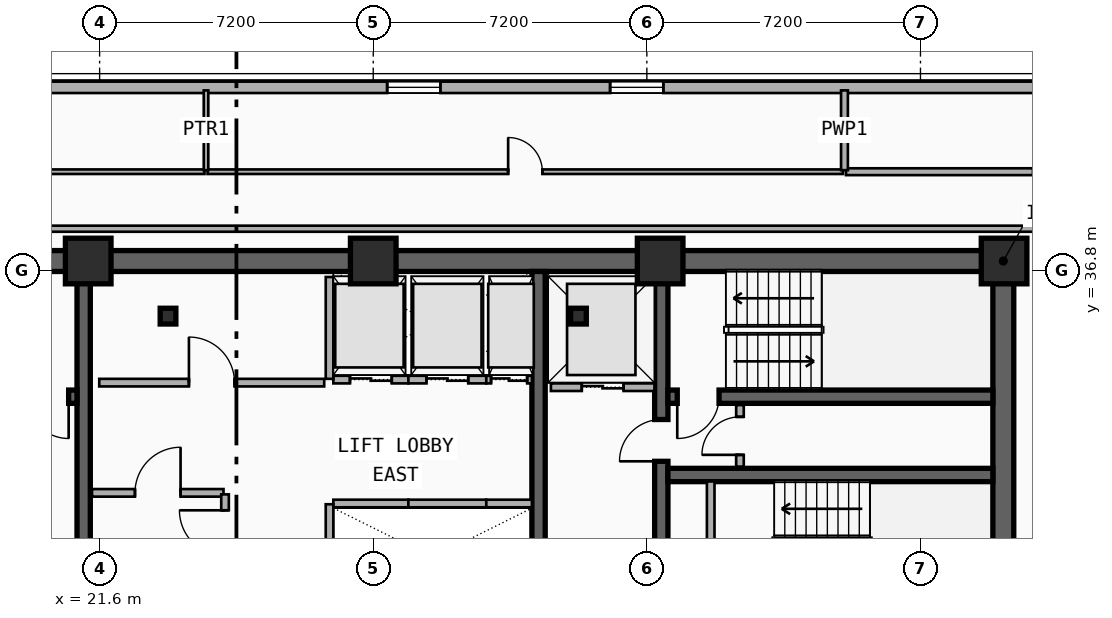
"""IFC4 building model, lengths in metres.
Left out: names, types, materials, properties, quantities, classifications, styles, units other than length and angle.
Written with IfcOpenShell. Run it as: python <this file> out.ifc"""

import sys

from ifc_helpers import new_model, si_unit, direction, frame, frame_2d, origin, origin_2d, place, context, subcontext, project, spatial, rectangle, i_section, extrude, element, fill, save


model = new_model("IFC4")
c1 = context("Model", 3, precision=1e-05, world=origin(), true_north=direction((0.0, 1.0)))
c2 = subcontext(c1, "Body", "Model", "MODEL_VIEW")
j1 = project(units=[si_unit("LENGTHUNIT", "METRE"), si_unit("PLANEANGLEUNIT", "RADIAN")], contexts=[c1])
p1 = place(None, origin())
s1 = spatial("IfcSite", under=j1, at=p1, CompositionType="ELEMENT")
p2 = place(p1, origin())
s2 = spatial("IfcBuilding", under=s1, at=p2, CompositionType="ELEMENT")
p3 = place(p2, frame((0.0, 0.0, 166.1)))
s3 = spatial("IfcBuildingStorey", under=s2, at=p3, CompositionType="ELEMENT", Elevation=166.1)
p4 = place(p3, frame((12.15, 37.05, 0.0), z_axis=(0.0, 0.0, 1.0), x_axis=(1.0, 0.0, 0.0)))
e1 = element("IfcWall", 1, at=p4, inside=s3, PredefinedType="SHEAR", context=c2, shape_type="SweptSolid", body=[
    extrude(rectangle(XDim=33.23, YDim=0.55, at=frame_2d((16.615, 0.0))), origin(), (0.0, 0.0, 1.0), 3.55),
])
p5 = place(p3, frame((45.38, 28.095, 0.0), z_axis=(0.0, 0.0, 1.0), x_axis=(0.0, 1.0, 0.0)))
e2 = element("IfcWall", 2, at=p5, inside=s3, PredefinedType="SHEAR", context=c2, shape_type="SweptSolid", body=[
    extrude(rectangle(XDim=8.68, YDim=0.55, at=frame_2d((4.34, 0.0))), origin(), (0.0, 0.0, 1.0), 3.55),
])
for number, where, z_axis, x_axis in (
    (3, (21.18, 28.095, 0.0), (0.0, 0.0, 1.0), (0.0, 1.0, 0.0)),
    (4, (33.15, 28.095, 0.0), (0.0, 0.0, 1.0), (0.0, 1.0, 0.0)),
):
    element("IfcWall", number, at=place(p3, frame(where, z_axis=z_axis, x_axis=x_axis)), inside=s3, PredefinedType="SHEAR", context=c2, shape_type="SweptSolid", body=[
        extrude(rectangle(XDim=8.68, YDim=0.35, at=frame_2d((4.34, 0.0))), origin(), (0.0, 0.0, 1.0), 3.55),
    ])
p6 = place(p3, frame((36.38, 28.095, 0.0), z_axis=(0.0, 0.0, 1.0), x_axis=(0.0, 1.0, 0.0)))
e5 = element("IfcWall", 5, at=p6, inside=s3, PredefinedType="SHEAR", context=c2, shape_type="SweptSolid", body=[
    extrude(rectangle(XDim=8.68, YDim=0.35, at=frame_2d((4.34, 0.0))), origin(), (0.0, 0.0, 1.0), 3.55),
])
p7 = place(p6, frame((3.685, 0.0, 0.0)))
e6 = element("IfcOpeningElement", 6, at=p7, cuts=e5, PredefinedType="OPENING", context=c2, shape_type="SweptSolid", body=[
    extrude(rectangle(XDim=1.1, YDim=2.15, at=frame_2d((0.55, 1.075))), frame((0.0, 0.185, 0.0), z_axis=(0.0, -1.0, 0.0), x_axis=(1.0, 0.0, 0.0)), (0.0, 0.0, 1.0), 0.37),
])
p8 = place(p3, frame((21.005, 33.48, 0.0), z_axis=(0.0, 0.0, 1.0), x_axis=(-1.0, 0.0, 0.0)))
e7 = element("IfcWall", 7, at=p8, inside=s3, PredefinedType="SHEAR", context=c2, shape_type="SweptSolid", body=[
    extrude(rectangle(XDim=8.58, YDim=0.35, at=frame_2d((4.29, 0.0))), origin(), (0.0, 0.0, 1.0), 3.55),
])
p9 = place(p8, frame((0.22, 0.0, 0.0)))
e8 = element("IfcOpeningElement", 8, at=p9, cuts=e7, PredefinedType="OPENING", context=c2, shape_type="SweptSolid", body=[
    extrude(rectangle(XDim=1.1, YDim=2.15, at=frame_2d((0.55, 1.075))), frame((0.0, 0.185, 0.0), z_axis=(0.0, -1.0, 0.0), x_axis=(1.0, 0.0, 0.0)), (0.0, 0.0, 1.0), 0.37),
])
p10 = place(p3, frame((45.105, 33.48, 0.0), z_axis=(0.0, 0.0, 1.0), x_axis=(-1.0, 0.0, 0.0)))
e9 = element("IfcWall", 9, at=p10, inside=s3, PredefinedType="SHEAR", context=c2, shape_type="SweptSolid", body=[
    extrude(rectangle(XDim=8.55, YDim=0.35, at=frame_2d((4.275, 0.0))), origin(), (0.0, 0.0, 1.0), 3.55),
])
p11 = place(p10, frame((7.205, 0.0, 0.0)))
e10 = element("IfcOpeningElement", 10, at=p11, cuts=e9, PredefinedType="OPENING", context=c2, shape_type="SweptSolid", body=[
    extrude(rectangle(XDim=1.1, YDim=2.15, at=frame_2d((0.55, 1.075))), frame((0.0, 0.185, 0.0), z_axis=(0.0, -1.0, 0.0), x_axis=(1.0, 0.0, 0.0)), (0.0, 0.0, 1.0), 0.37),
])
p12 = place(p3, frame((36.555, 31.42, 0.0), z_axis=(0.0, 0.0, 1.0), x_axis=(1.0, 0.0, 0.0)))
e11 = element("IfcWall", 11, at=p12, inside=s3, PredefinedType="SHEAR", context=c2, shape_type="SweptSolid", body=[
    extrude(rectangle(XDim=8.55, YDim=0.35, at=frame_2d((4.275, 0.0))), origin(), (0.0, 0.0, 1.0), 3.55),
])
for number, where, z_axis, x_axis in (
    (12, (34.2, 35.6, 0.0), (0.0, 0.0, 1.0), (1.0, 0.0, 0.0)),
    (13, (23.4, 35.6, 0.0), (0.0, 0.0, 1.0), (1.0, 0.0, 0.0)),
):
    element("IfcColumn", number, at=place(p3, frame(where, z_axis=z_axis, x_axis=x_axis)), inside=s3, PredefinedType="COLUMN", context=c2, shape_type="SweptSolid", body=[
        extrude(i_section(OverallWidth=0.413, OverallDepth=0.415, WebThickness=0.03, FlangeThickness=0.047, FilletRadius=0.015, at=origin_2d()), origin(), (0.0, 0.0, 1.0), 3.55),
    ])
for number, where, z_axis, x_axis in (
    (14, (21.3, 37.05, 0.0), (0.0, 0.0, 1.0), (1.0, 0.0, 0.0)),
    (15, (28.8, 37.05, 0.0), (0.0, 0.0, 1.0), (1.0, 0.0, 0.0)),
    (16, (36.35, 37.05, 0.0), (0.0, 0.0, 1.0), (1.0, 0.0, 0.0)),
    (17, (45.4, 37.05, 0.0), (0.0, 0.0, 1.0), (1.0, 0.0, 0.0)),
):
    element("IfcColumn", number, at=place(p3, frame(where, z_axis=z_axis, x_axis=x_axis)), inside=s3, PredefinedType="COLUMN", context=c2, shape_type="SweptSolid", body=[
        extrude(rectangle(XDim=1.2, YDim=1.2, at=origin_2d()), origin(), (0.0, 0.0, 1.0), 3.55),
    ])
p13 = place(p3, frame((9.6, 41.62, 0.0), z_axis=(0.0, 0.0, 1.0), x_axis=(1.0, 0.0, 0.0)))
e18 = element("IfcWall", 18, at=p13, inside=s3, PredefinedType="SOLIDWALL", context=c2, shape_type="SweptSolid", body=[
    extrude(rectangle(XDim=38.4, YDim=0.3, at=frame_2d((19.2, 0.0))), origin(), (0.0, 0.0, 1.0), 3.29),
])
p14 = place(p13, frame((4.113, 0.0, 0.75)))
e19 = element("IfcOpeningElement", 19, at=p14, cuts=e18, PredefinedType="OPENING", context=c2, shape_type="SweptSolid", body=[
    extrude(rectangle(XDim=1.4, YDim=2.1, at=frame_2d((0.7, 1.05))), frame((0.0, 0.16, 0.0), z_axis=(0.0, -1.0, 0.0), x_axis=(1.0, 0.0, 0.0)), (0.0, 0.0, 1.0), 0.32),
])
p15 = place(p13, frame((9.307, 0.0, 0.75)))
e20 = element("IfcOpeningElement", 20, at=p15, cuts=e18, PredefinedType="OPENING", context=c2, shape_type="SweptSolid", body=[
    extrude(rectangle(XDim=1.4, YDim=2.1, at=frame_2d((0.7, 1.05))), frame((0.0, 0.16, 0.0), z_axis=(0.0, -1.0, 0.0), x_axis=(1.0, 0.0, 0.0)), (0.0, 0.0, 1.0), 0.32),
])
p16 = place(p13, frame((19.567, 0.0, 0.75)))
e21 = element("IfcOpeningElement", 21, at=p16, cuts=e18, PredefinedType="OPENING", context=c2, shape_type="SweptSolid", body=[
    extrude(rectangle(XDim=1.4, YDim=2.1, at=frame_2d((0.7, 1.05))), frame((0.0, 0.16, 0.0), z_axis=(0.0, -1.0, 0.0), x_axis=(1.0, 0.0, 0.0)), (0.0, 0.0, 1.0), 0.32),
])
p17 = place(p13, frame((25.433, 0.0, 0.75)))
e22 = element("IfcOpeningElement", 22, at=p17, cuts=e18, PredefinedType="OPENING", context=c2, shape_type="SweptSolid", body=[
    extrude(rectangle(XDim=1.4, YDim=2.1, at=frame_2d((0.7, 1.05))), frame((0.0, 0.16, 0.0), z_axis=(0.0, -1.0, 0.0), x_axis=(1.0, 0.0, 0.0)), (0.0, 0.0, 1.0), 0.32),
])
p18 = place(p3, frame((33.475, 33.73, 0.0), z_axis=(0.0, 0.0, 1.0), x_axis=(1.0, 0.0, 0.0)))
e23 = element("IfcWall", 23, at=p18, inside=s3, PredefinedType="PARTITIONING", context=c2, shape_type="SweptSolid", body=[
    extrude(rectangle(XDim=2.725, YDim=0.2, at=frame_2d((1.362, 0.0))), origin(), (0.0, 0.0, 1.0), 2.36),
])
p19 = place(p18, frame((0.812, 0.0, 0.0)))
e24 = element("IfcOpeningElement", 24, at=p19, cuts=e23, PredefinedType="OPENING", context=c2, shape_type="SweptSolid", body=[
    extrude(rectangle(XDim=1.1, YDim=2.15, at=frame_2d((0.55, 1.075))), frame((0.0, 0.11, 0.0), z_axis=(0.0, -1.0, 0.0), x_axis=(1.0, 0.0, 0.0)), (0.0, 0.0, 1.0), 0.22),
])
p20 = place(p3, frame((27.75, 30.67, 0.0), z_axis=(0.0, 0.0, 1.0), x_axis=(1.0, 0.0, 0.0)))
e25 = element("IfcWall", 25, at=p20, inside=s3, PredefinedType="PARTITIONING", context=c2, shape_type="SweptSolid", body=[
    extrude(rectangle(XDim=1.975, YDim=0.2, at=frame_2d((0.988, 0.0))), origin(), (0.0, 0.0, 1.0), 2.36),
])
p21 = place(p3, frame((27.65, 28.07, 0.0), z_axis=(0.0, 0.0, 1.0), x_axis=(0.0, 1.0, 0.0)))
e26 = element("IfcWall", 26, at=p21, inside=s3, PredefinedType="PARTITIONING", context=c2, shape_type="SweptSolid", body=[
    extrude(rectangle(XDim=2.58, YDim=0.2, at=frame_2d((1.29, 0.0))), origin(), (0.0, 0.0, 1.0), 2.36),
])
p22 = place(p3, frame((29.725, 30.67, 0.0), z_axis=(0.0, 0.0, 1.0), x_axis=(1.0, 0.0, 0.0)))
e27 = element("IfcWall", 27, at=p22, inside=s3, PredefinedType="PARTITIONING", context=c2, shape_type="SweptSolid", body=[
    extrude(rectangle(XDim=2.05, YDim=0.2, at=frame_2d((1.025, 0.0))), origin(), (0.0, 0.0, 1.0), 2.67),
])
p23 = place(p3, frame((31.775, 30.67, 0.0), z_axis=(0.0, 0.0, 1.0), x_axis=(1.0, 0.0, 0.0)))
e28 = element("IfcWall", 28, at=p23, inside=s3, PredefinedType="PARTITIONING", context=c2, shape_type="SweptSolid", body=[
    extrude(rectangle(XDim=1.2, YDim=0.2, at=frame_2d((0.6, 0.0))), origin(), (0.0, 0.0, 1.0), 2.67),
])
p24 = place(p3, frame((27.75, 33.93, 0.0), z_axis=(0.0, 0.0, 1.0), x_axis=(1.0, 0.0, 0.0)))
e29 = element("IfcWall", 29, at=p24, inside=s3, PredefinedType="PARTITIONING", context=c2, shape_type="SweptSolid", body=[
    extrude(rectangle(XDim=1.975, YDim=0.2, at=frame_2d((0.988, 0.0))), origin(), (0.0, 0.0, 1.0), 2.36),
])
p25 = place(p24, frame((0.438, 0.0, 0.0)))
e30 = element("IfcOpeningElement", 30, at=p25, cuts=e29, PredefinedType="OPENING", context=c2, shape_type="SweptSolid", body=[
    extrude(rectangle(XDim=1.1, YDim=2.15, at=frame_2d((0.55, 1.075))), frame((0.0, 0.11, 0.0), z_axis=(0.0, -1.0, 0.0), x_axis=(1.0, 0.0, 0.0)), (0.0, 0.0, 1.0), 0.22),
])
p26 = place(p3, frame((27.65, 33.95, 0.0), z_axis=(0.0, 0.0, 1.0), x_axis=(0.0, 1.0, 0.0)))
e31 = element("IfcWall", 31, at=p26, inside=s3, PredefinedType="PARTITIONING", context=c2, shape_type="SweptSolid", body=[
    extrude(rectangle(XDim=2.68, YDim=0.2, at=frame_2d((1.34, 0.0))), origin(), (0.0, 0.0, 1.0), 2.36),
])
p27 = place(p3, frame((29.725, 33.93, 0.0), z_axis=(0.0, 0.0, 1.0), x_axis=(1.0, 0.0, 0.0)))
e32 = element("IfcWall", 32, at=p27, inside=s3, PredefinedType="PARTITIONING", context=c2, shape_type="SweptSolid", body=[
    extrude(rectangle(XDim=2.05, YDim=0.2, at=frame_2d((1.025, 0.0))), origin(), (0.0, 0.0, 1.0), 3.29),
])
p28 = place(p27, frame((0.475, 0.0, 0.0)))
e33 = element("IfcOpeningElement", 33, at=p28, cuts=e32, PredefinedType="OPENING", context=c2, shape_type="SweptSolid", body=[
    extrude(rectangle(XDim=1.1, YDim=2.15, at=frame_2d((0.55, 1.075))), frame((0.0, 0.11, 0.0), z_axis=(0.0, -1.0, 0.0), x_axis=(1.0, 0.0, 0.0)), (0.0, 0.0, 1.0), 0.22),
])
p29 = place(p3, frame((31.775, 33.93, 0.0), z_axis=(0.0, 0.0, 1.0), x_axis=(1.0, 0.0, 0.0)))
e34 = element("IfcWall", 34, at=p29, inside=s3, PredefinedType="PARTITIONING", context=c2, shape_type="SweptSolid", body=[
    extrude(rectangle(XDim=1.2, YDim=0.2, at=frame_2d((0.6, 0.0))), origin(), (0.0, 0.0, 1.0), 3.29),
])
p30 = place(p29, frame((0.125, 0.0, 0.0)))
e35 = element("IfcOpeningElement", 35, at=p30, cuts=e34, PredefinedType="OPENING", context=c2, shape_type="SweptSolid", body=[
    extrude(rectangle(XDim=0.95, YDim=2.15, at=frame_2d((0.475, 1.075))), frame((0.0, 0.11, 0.0), z_axis=(0.0, -1.0, 0.0), x_axis=(1.0, 0.0, 0.0)), (0.0, 0.0, 1.0), 0.22),
])
p31 = place(p3, frame((37.68, 28.095, 0.0), z_axis=(0.0, 0.0, 1.0), x_axis=(0.0, 1.0, 0.0)))
e36 = element("IfcWall", 36, at=p31, inside=s3, PredefinedType="PARTITIONING", context=c2, shape_type="SweptSolid", body=[
    extrude(rectangle(XDim=3.155, YDim=0.2, at=frame_2d((1.578, 0.0))), origin(), (0.0, 0.0, 1.0), 2.67),
])
p32 = place(p3, frame((38.45, 31.64, 0.0), z_axis=(0.0, 0.0, 1.0), x_axis=(0.0, 1.0, 0.0)))
e37 = element("IfcWall", 37, at=p32, inside=s3, PredefinedType="PARTITIONING", context=c2, shape_type="SweptSolid", body=[
    extrude(rectangle(XDim=1.62, YDim=0.2, at=frame_2d((0.81, 0.0))), origin(), (0.0, 0.0, 1.0), 3.29),
])
p33 = place(p32, frame((0.31, 0.0, 0.0)))
e38 = element("IfcOpeningElement", 38, at=p33, cuts=e37, PredefinedType="OPENING", context=c2, shape_type="SweptSolid", body=[
    extrude(rectangle(XDim=1.0, YDim=2.15, at=frame_2d((0.5, 1.075))), frame((0.0, 0.11, 0.0), z_axis=(0.0, -1.0, 0.0), x_axis=(1.0, 0.0, 0.0)), (0.0, 0.0, 1.0), 0.22),
])
p34 = place(p3, frame((21.4, 30.95, 0.0), z_axis=(0.0, 0.0, 1.0), x_axis=(1.0, 0.0, 0.0)))
e39 = element("IfcWall", 39, at=p34, inside=s3, PredefinedType="PARTITIONING", context=c2, shape_type="SweptSolid", body=[
    extrude(rectangle(XDim=3.46, YDim=0.2, at=frame_2d((1.73, 0.0))), origin(), (0.0, 0.0, 1.0), 2.36),
])
p35 = place(p34, frame((1.13, 0.0, 0.0)))
e40 = element("IfcOpeningElement", 40, at=p35, cuts=e39, PredefinedType="OPENING", context=c2, shape_type="SweptSolid", body=[
    extrude(rectangle(XDim=1.2, YDim=2.15, at=frame_2d((0.6, 1.075))), frame((0.0, 0.11, 0.0), z_axis=(0.0, -1.0, 0.0), x_axis=(1.0, 0.0, 0.0)), (0.0, 0.0, 1.0), 0.22),
])
p36 = place(p3, frame((21.59, 33.85, 0.0), z_axis=(0.0, 0.0, 1.0), x_axis=(1.0, 0.0, 0.0)))
e41 = element("IfcWall", 41, at=p36, inside=s3, PredefinedType="PARTITIONING", context=c2, shape_type="SweptSolid", body=[
    extrude(rectangle(XDim=5.92, YDim=0.2, at=frame_2d((2.96, 0.0))), origin(), (0.0, 0.0, 1.0), 2.36),
])
p37 = place(p36, frame((2.36, 0.0, 0.0)))
e42 = element("IfcOpeningElement", 42, at=p37, cuts=e41, PredefinedType="OPENING", context=c2, shape_type="SweptSolid", body=[
    extrude(rectangle(XDim=1.2, YDim=2.15, at=frame_2d((0.6, 1.075))), frame((0.0, 0.11, 0.0), z_axis=(0.0, -1.0, 0.0), x_axis=(1.0, 0.0, 0.0)), (0.0, 0.0, 1.0), 0.22),
])
p38 = place(p3, frame((24.9, 28.09, 0.0), z_axis=(0.0, 0.0, 1.0), x_axis=(0.0, 1.0, 0.0)))
e43 = element("IfcWall", 43, at=p38, inside=s3, PredefinedType="PARTITIONING", context=c2, shape_type="SweptSolid", body=[
    extrude(rectangle(XDim=2.82, YDim=0.2, at=frame_2d((1.41, 0.0))), origin(), (0.0, 0.0, 1.0), 2.67),
])
p39 = place(p38, frame((1.201, 0.0, 0.0)))
e44 = element("IfcOpeningElement", 44, at=p39, cuts=e43, PredefinedType="OPENING", context=c2, shape_type="SweptSolid", body=[
    extrude(rectangle(XDim=1.2, YDim=2.15, at=frame_2d((0.6, 1.075))), frame((0.0, 0.11, 0.0), z_axis=(0.0, -1.0, 0.0), x_axis=(1.0, 0.0, 0.0)), (0.0, 0.0, 1.0), 0.22),
])
p40 = place(p3, frame((5.66, 39.4, 0.0), z_axis=(0.0, 0.0, 1.0), x_axis=(1.0, 0.0, 0.0)))
e45 = element("IfcWall", 45, at=p40, inside=s3, PredefinedType="PARTITIONING", context=c2, shape_type="SweptSolid", body=[
    extrude(rectangle(XDim=18.7, YDim=0.12, at=frame_2d((9.35, 0.0))), origin(), (0.0, 0.0, 1.0), 3.29),
])
p41 = place(p40, frame((8.9, 0.0, 0.0)))
e46 = element("IfcOpeningElement", 46, at=p41, cuts=e45, PredefinedType="OPENING", context=c2, shape_type="SweptSolid", body=[
    extrude(rectangle(XDim=0.9, YDim=2.1, at=frame_2d((0.45, 1.05))), frame((0.0, 0.07, 0.0), z_axis=(0.0, -1.0, 0.0), x_axis=(1.0, 0.0, 0.0)), (0.0, 0.0, 1.0), 0.14),
])
p42 = place(p3, frame((24.44, 39.4, 0.0), z_axis=(0.0, 0.0, 1.0), x_axis=(1.0, 0.0, 0.0)))
e47 = element("IfcWall", 47, at=p42, inside=s3, PredefinedType="PARTITIONING", context=c2, shape_type="SweptSolid", body=[
    extrude(rectangle(XDim=16.72, YDim=0.12, at=frame_2d((8.36, 0.0))), origin(), (0.0, 0.0, 1.0), 3.29),
])
p43 = place(p42, frame((7.91, 0.0, 0.0)))
e48 = element("IfcOpeningElement", 48, at=p43, cuts=e47, PredefinedType="OPENING", context=c2, shape_type="SweptSolid", body=[
    extrude(rectangle(XDim=0.9, YDim=2.1, at=frame_2d((0.45, 1.05))), frame((0.0, 0.07, 0.0), z_axis=(0.0, -1.0, 0.0), x_axis=(1.0, 0.0, 0.0)), (0.0, 0.0, 1.0), 0.14),
])
p44 = place(p3, frame((41.24, 39.4, 0.0), z_axis=(0.0, 0.0, 1.0), x_axis=(1.0, 0.0, 0.0)))
e49 = element("IfcWall", 49, at=p44, inside=s3, PredefinedType="PLUMBINGWALL", context=c2, shape_type="SweptSolid", body=[
    extrude(rectangle(XDim=10.7, YDim=0.18, at=frame_2d((5.35, 0.0))), origin(), (0.0, 0.0, 1.0), 3.29),
])
p45 = place(p44, frame((4.925, 0.0, 0.0)))
e50 = element("IfcOpeningElement", 50, at=p45, cuts=e49, PredefinedType="OPENING", context=c2, shape_type="SweptSolid", body=[
    extrude(rectangle(XDim=0.85, YDim=2.1, at=frame_2d((0.425, 1.05))), frame((0.0, 0.1, 0.0), z_axis=(0.0, -1.0, 0.0), x_axis=(1.0, 0.0, 0.0)), (0.0, 0.0, 1.0), 0.2),
])
p46 = place(p3, frame((24.4, 39.44, 0.0), z_axis=(0.0, 0.0, 1.0), x_axis=(0.0, 1.0, 0.0)))
e51 = element("IfcWall", 51, at=p46, inside=s3, PredefinedType="PARTITIONING", context=c2, shape_type="SweptSolid", body=[
    extrude(rectangle(XDim=2.1, YDim=0.12, at=frame_2d((1.05, 0.0))), origin(), (0.0, 0.0, 1.0), 3.29),
])
p47 = place(p3, frame((41.2, 39.44, 0.0), z_axis=(0.0, 0.0, 1.0), x_axis=(0.0, 1.0, 0.0)))
e52 = element("IfcWall", 52, at=p47, inside=s3, PredefinedType="PLUMBINGWALL", context=c2, shape_type="SweptSolid", body=[
    extrude(rectangle(XDim=2.1, YDim=0.18, at=frame_2d((1.05, 0.0))), origin(), (0.0, 0.0, 1.0), 3.29),
])
p48 = place(p3, frame((11.28, 37.9, 0.0), z_axis=(0.0, 0.0, 1.0), x_axis=(1.0, 0.0, 0.0)))
e53 = element("IfcWall", 53, at=p48, inside=s3, PredefinedType="PARTITIONING", context=c2, shape_type="SweptSolid", body=[
    extrude(rectangle(XDim=35.04, YDim=0.16, at=frame_2d((17.52, 0.0))), origin(), (0.0, 0.0, 1.0), 3.29),
])
p49 = place(p16, origin())
e54 = element("IfcWindow", 54, at=p49, inside=s3, PartitioningType="SINGLE_PANEL", PredefinedType="WINDOW", context=c2, shape_type="SweptSolid", body=[
    extrude(rectangle(XDim=1.4, YDim=2.1, at=frame_2d((0.7, 1.05))), frame((0.0, 0.03, 0.0), z_axis=(0.0, -1.0, 0.0), x_axis=(1.0, 0.0, 0.0)), (0.0, 0.0, 1.0), 0.06),
])
fill(e21, e54)
p50 = place(p17, origin())
e55 = element("IfcWindow", 55, at=p50, inside=s3, PartitioningType="SINGLE_PANEL", PredefinedType="WINDOW", context=c2, shape_type="SweptSolid", body=[
    extrude(rectangle(XDim=1.4, YDim=2.1, at=frame_2d((0.7, 1.05))), frame((0.0, 0.03, 0.0), z_axis=(0.0, -1.0, 0.0), x_axis=(1.0, 0.0, 0.0)), (0.0, 0.0, 1.0), 0.06),
])
fill(e22, e55)
p51 = place(p19, origin())
e56 = element("IfcDoor", 56, at=p51, inside=s3, OperationType="DOUBLE_DOOR_SLIDING", PredefinedType="DOOR", context=c2, shape_type="SweptSolid", body=[
    extrude(rectangle(XDim=1.1, YDim=2.15, at=frame_2d((0.55, 1.075))), frame((0.0, 0.025, 0.0), z_axis=(0.0, -1.0, 0.0), x_axis=(1.0, 0.0, 0.0)), (0.0, 0.0, 1.0), 0.05),
])
fill(e24, e56)
p52 = place(p25, origin())
e57 = element("IfcDoor", 57, at=p52, inside=s3, OperationType="DOUBLE_DOOR_SLIDING", PredefinedType="DOOR", context=c2, shape_type="SweptSolid", body=[
    extrude(rectangle(XDim=1.1, YDim=2.15, at=frame_2d((0.55, 1.075))), frame((0.0, 0.025, 0.0), z_axis=(0.0, -1.0, 0.0), x_axis=(1.0, 0.0, 0.0)), (0.0, 0.0, 1.0), 0.05),
])
fill(e30, e57)
p53 = place(p28, origin())
e58 = element("IfcDoor", 58, at=p53, inside=s3, OperationType="DOUBLE_DOOR_SLIDING", PredefinedType="DOOR", context=c2, shape_type="SweptSolid", body=[
    extrude(rectangle(XDim=1.1, YDim=2.15, at=frame_2d((0.55, 1.075))), frame((0.0, 0.025, 0.0), z_axis=(0.0, -1.0, 0.0), x_axis=(1.0, 0.0, 0.0)), (0.0, 0.0, 1.0), 0.05),
])
fill(e33, e58)
p54 = place(p30, origin())
e59 = element("IfcDoor", 59, at=p54, inside=s3, OperationType="DOUBLE_DOOR_SLIDING", PredefinedType="DOOR", context=c2, shape_type="SweptSolid", body=[
    extrude(rectangle(XDim=0.95, YDim=2.15, at=frame_2d((0.475, 1.075))), frame((0.0, 0.025, 0.0), z_axis=(0.0, -1.0, 0.0), x_axis=(1.0, 0.0, 0.0)), (0.0, 0.0, 1.0), 0.05),
])
fill(e35, e59)
p55 = place(p9, origin())
e60 = element("IfcDoor", 60, at=p55, inside=s3, OperationType="SINGLE_SWING_LEFT", PredefinedType="DOOR", context=c2, shape_type="SweptSolid", body=[
    extrude(rectangle(XDim=1.1, YDim=2.15, at=frame_2d((0.55, 1.075))), frame((0.0, 0.025, 0.0), z_axis=(0.0, -1.0, 0.0), x_axis=(1.0, 0.0, 0.0)), (0.0, 0.0, 1.0), 0.05),
])
fill(e8, e60)
p56 = place(p11, origin())
e61 = element("IfcDoor", 61, at=p56, inside=s3, OperationType="SINGLE_SWING_RIGHT", PredefinedType="DOOR", context=c2, shape_type="SweptSolid", body=[
    extrude(rectangle(XDim=1.1, YDim=2.15, at=frame_2d((0.55, 1.075))), frame((0.0, 0.025, 0.0), z_axis=(0.0, -1.0, 0.0), x_axis=(1.0, 0.0, 0.0)), (0.0, 0.0, 1.0), 0.05),
])
fill(e10, e61)
p57 = place(p7, origin())
e62 = element("IfcDoor", 62, at=p57, inside=s3, OperationType="SINGLE_SWING_LEFT", PredefinedType="DOOR", context=c2, shape_type="SweptSolid", body=[
    extrude(rectangle(XDim=1.1, YDim=2.15, at=frame_2d((0.55, 1.075))), frame((0.0, 0.025, 0.0), z_axis=(0.0, -1.0, 0.0), x_axis=(1.0, 0.0, 0.0)), (0.0, 0.0, 1.0), 0.05),
])
fill(e6, e62)
p58 = place(p33, origin())
e63 = element("IfcDoor", 63, at=p58, inside=s3, OperationType="SINGLE_SWING_LEFT", PredefinedType="DOOR", context=c2, shape_type="SweptSolid", body=[
    extrude(rectangle(XDim=1.0, YDim=2.15, at=frame_2d((0.5, 1.075))), frame((0.0, 0.025, 0.0), z_axis=(0.0, -1.0, 0.0), x_axis=(1.0, 0.0, 0.0)), (0.0, 0.0, 1.0), 0.05),
])
fill(e38, e63)
p59 = place(p35, origin())
e64 = element("IfcDoor", 64, at=p59, inside=s3, OperationType="SINGLE_SWING_RIGHT", PredefinedType="DOOR", context=c2, shape_type="SweptSolid", body=[
    extrude(rectangle(XDim=1.2, YDim=2.15, at=frame_2d((0.6, 1.075))), frame((0.0, 0.025, 0.0), z_axis=(0.0, -1.0, 0.0), x_axis=(1.0, 0.0, 0.0)), (0.0, 0.0, 1.0), 0.05),
])
fill(e40, e64)
p60 = place(p37, origin())
e65 = element("IfcDoor", 65, at=p60, inside=s3, OperationType="SINGLE_SWING_LEFT", PredefinedType="DOOR", context=c2, shape_type="SweptSolid", body=[
    extrude(rectangle(XDim=1.2, YDim=2.15, at=frame_2d((0.6, 1.075))), frame((0.0, 0.025, 0.0), z_axis=(0.0, -1.0, 0.0), x_axis=(1.0, 0.0, 0.0)), (0.0, 0.0, 1.0), 0.05),
])
fill(e42, e65)
p61 = place(p39, origin())
e66 = element("IfcDoor", 66, at=p61, inside=s3, OperationType="SINGLE_SWING_RIGHT", PredefinedType="DOOR", context=c2, shape_type="SweptSolid", body=[
    extrude(rectangle(XDim=1.2, YDim=2.15, at=frame_2d((0.6, 1.075))), frame((0.0, 0.025, 0.0), z_axis=(0.0, -1.0, 0.0), x_axis=(1.0, 0.0, 0.0)), (0.0, 0.0, 1.0), 0.05),
])
fill(e44, e66)
p62 = place(p43, origin())
e67 = element("IfcDoor", 67, at=p62, inside=s3, OperationType="SINGLE_SWING_LEFT", PredefinedType="DOOR", context=c2, shape_type="SweptSolid", body=[
    extrude(rectangle(XDim=0.9, YDim=2.1, at=frame_2d((0.45, 1.05))), frame((0.0, 0.025, 0.0), z_axis=(0.0, -1.0, 0.0), x_axis=(1.0, 0.0, 0.0)), (0.0, 0.0, 1.0), 0.05),
])
fill(e48, e67)
save(model, sys.argv[1])
